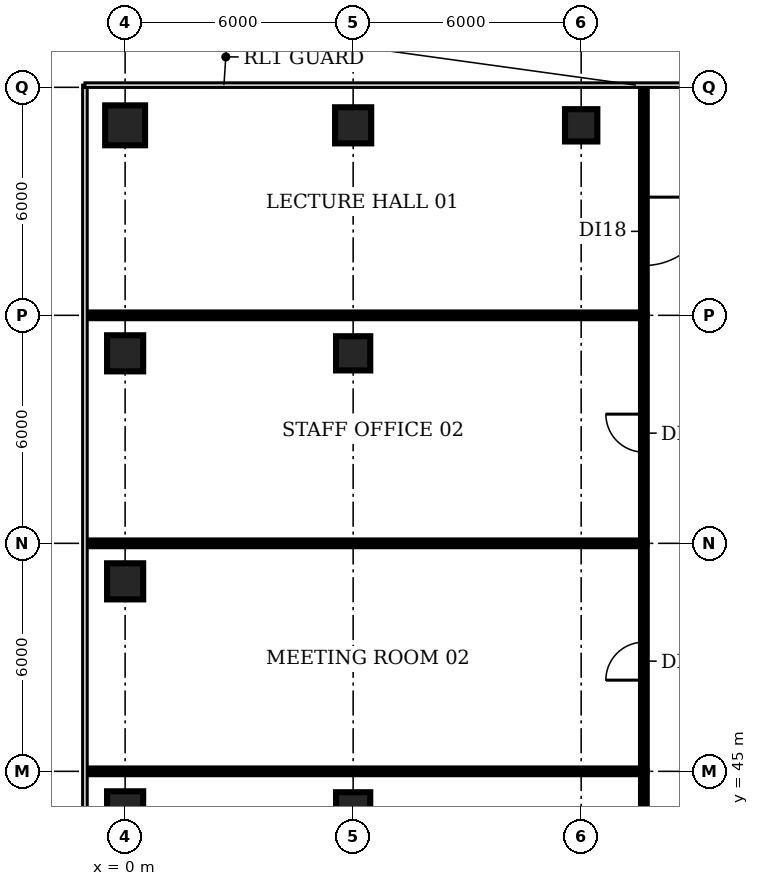
"""IFC4 building model, lengths in metres.
Left out: names, types, materials, properties, quantities, classifications, styles, units other than length and angle.
Written with IfcOpenShell. Run it as: python <this file> out.ifc"""

import sys

from ifc_helpers import new_model, si_unit, direction, frame, frame_2d, origin, origin_2d, place, context, subcontext, project, spatial, rectangle, circle, extrude, element, fill, save


model = new_model("IFC4")
c1 = context("Model", 3, precision=1e-05, world=origin(), true_north=direction((0.0, 1.0)))
c2 = subcontext(c1, "Body", "Model", "MODEL_VIEW")
j1 = project(units=[si_unit("LENGTHUNIT", "METRE"), si_unit("PLANEANGLEUNIT", "RADIAN")], contexts=[c1])
p1 = place(None, origin())
s1 = spatial("IfcSite", under=j1, at=p1, CompositionType="ELEMENT")
p2 = place(p1, origin())
s2 = spatial("IfcBuilding", under=s1, at=p2, CompositionType="ELEMENT")
p3 = place(p2, frame((0.0, 0.0, 146.6)))
s3 = spatial("IfcBuildingStorey", under=s2, at=p3, CompositionType="ELEMENT", Elevation=146.6)
for number, where, z_axis, x_axis in (
    (1, (0.0, 44.0, -0.35), (0.0, 0.0, 1.0), (1.0, 0.0, 0.0)),
    (2, (0.0, 50.0, -0.35), (0.0, 0.0, 1.0), (1.0, 0.0, 0.0)),
    (3, (0.0, 56.0, -0.35), (0.0, 0.0, 1.0), (1.0, 0.0, 0.0)),
):
    element("IfcColumn", number, at=place(p3, frame(where, z_axis=z_axis, x_axis=x_axis)), inside=s3, PredefinedType="COLUMN", context=c2, shape_type="SweptSolid", body=[
        extrude(rectangle(XDim=0.95, YDim=0.95, at=origin_2d()), origin(), (0.0, 0.0, 1.0), 4.2),
    ])
p4 = place(p3, frame((0.0, 62.0, -0.35), z_axis=(0.0, 0.0, 1.0), x_axis=(1.0, 0.0, 0.0)))
e4 = element("IfcColumn", 4, at=p4, inside=s3, PredefinedType="COLUMN", context=c2, shape_type="SweptSolid", body=[
    extrude(circle(Radius=0.525, at=origin_2d()), origin(), (0.0, 0.0, 1.0), 4.2),
])
for number, where, z_axis, x_axis in (
    (5, (6.0, 44.0, -0.35), (0.0, 0.0, 1.0), (1.0, 0.0, 0.0)),
    (6, (6.0, 56.0, -0.35), (0.0, 0.0, 1.0), (1.0, 0.0, 0.0)),
):
    element("IfcColumn", number, at=place(p3, frame(where, z_axis=z_axis, x_axis=x_axis)), inside=s3, PredefinedType="COLUMN", context=c2, shape_type="SweptSolid", body=[
        extrude(rectangle(XDim=0.9, YDim=0.9, at=origin_2d()), origin(), (0.0, 0.0, 1.0), 4.2),
    ])
p5 = place(p3, frame((6.0, 62.0, -0.35), z_axis=(0.0, 0.0, 1.0), x_axis=(1.0, 0.0, 0.0)))
e7 = element("IfcColumn", 7, at=p5, inside=s3, PredefinedType="COLUMN", context=c2, shape_type="SweptSolid", body=[
    extrude(rectangle(XDim=0.95, YDim=0.95, at=origin_2d()), origin(), (0.0, 0.0, 1.0), 4.2),
])
p6 = place(p3, frame((12.0, 62.0, 0.0), z_axis=(0.0, 0.0, 1.0), x_axis=(1.0, 0.0, 0.0)))
e8 = element("IfcColumn", 8, at=p6, inside=s3, PredefinedType="COLUMN", context=c2, shape_type="SweptSolid", body=[
    extrude(rectangle(XDim=0.85, YDim=0.85, at=origin_2d()), origin(), (0.0, 0.0, 1.0), 3.85),
])
for number, where, z_axis, x_axis in (
    (9, (-1.01, 45.0, 0.0), (0.0, 0.0, 1.0), (1.0, 0.0, 0.0)),
    (10, (-1.01, 51.0, 0.0), (0.0, 0.0, 1.0), (1.0, 0.0, 0.0)),
):
    element("IfcWall", number, at=place(p3, frame(where, z_axis=z_axis, x_axis=x_axis)), inside=s3, PredefinedType="PARTITIONING", context=c2, shape_type="SweptSolid", body=[
        extrude(rectangle(XDim=14.66, YDim=0.15, at=frame_2d((7.33, 0.0))), origin(), (0.0, 0.0, 1.0), 2.88),
    ])
p7 = place(p3, frame((-0.993, 57.0, 0.0), z_axis=(0.0, 0.0, 1.0), x_axis=(1.0, 0.0, 0.0)))
e11 = element("IfcWall", 11, at=p7, inside=s3, PredefinedType="PARTITIONING", context=c2, shape_type="SweptSolid", body=[
    extrude(rectangle(XDim=14.643, YDim=0.15, at=frame_2d((7.321, 0.0))), origin(), (0.0, 0.0, 1.0), 2.88),
])
p8 = place(p3, frame((13.65, 34.1, 0.0), z_axis=(0.0, 0.0, 1.0), x_axis=(0.0, 1.0, 0.0)))
e12 = element("IfcWall", 12, at=p8, inside=s3, PredefinedType="PARTITIONING", context=c2, shape_type="SweptSolid", body=[
    extrude(rectangle(XDim=10.9, YDim=0.15, at=frame_2d((5.45, 0.0))), origin(), (0.0, 0.0, 1.0), 2.88),
])
p9 = place(p8, frame((4.9, 0.0, 0.0)))
e13 = element("IfcOpeningElement", 13, at=p9, cuts=e12, PredefinedType="OPENING", context=c2, shape_type="SweptSolid", body=[
    extrude(rectangle(XDim=1.0, YDim=2.1, at=frame_2d((0.5, 1.05))), frame((0.0, 0.085, 0.0), z_axis=(0.0, -1.0, 0.0), x_axis=(1.0, 0.0, 0.0)), (0.0, 0.0, 1.0), 0.17),
])
p10 = place(p3, frame((13.65, 45.0, 0.0), z_axis=(0.0, 0.0, 1.0), x_axis=(0.0, 1.0, 0.0)))
e14 = element("IfcWall", 14, at=p10, inside=s3, PredefinedType="PARTITIONING", context=c2, shape_type="SweptSolid", body=[
    extrude(rectangle(XDim=6.0, YDim=0.15, at=frame_2d((3.0, 0.0))), origin(), (0.0, 0.0, 1.0), 2.88),
])
p11 = place(p10, frame((2.4, 0.0, 0.0)))
e15 = element("IfcOpeningElement", 15, at=p11, cuts=e14, PredefinedType="OPENING", context=c2, shape_type="SweptSolid", body=[
    extrude(rectangle(XDim=1.0, YDim=2.1, at=frame_2d((0.5, 1.05))), frame((0.0, 0.085, 0.0), z_axis=(0.0, -1.0, 0.0), x_axis=(1.0, 0.0, 0.0)), (0.0, 0.0, 1.0), 0.17),
])
p12 = place(p3, frame((13.65, 51.0, 0.0), z_axis=(0.0, 0.0, 1.0), x_axis=(0.0, 1.0, 0.0)))
e16 = element("IfcWall", 16, at=p12, inside=s3, PredefinedType="PARTITIONING", context=c2, shape_type="SweptSolid", body=[
    extrude(rectangle(XDim=6.0, YDim=0.15, at=frame_2d((3.0, 0.0))), origin(), (0.0, 0.0, 1.0), 2.88),
])
p13 = place(p12, frame((2.4, 0.0, 0.0)))
e17 = element("IfcOpeningElement", 17, at=p13, cuts=e16, PredefinedType="OPENING", context=c2, shape_type="SweptSolid", body=[
    extrude(rectangle(XDim=1.0, YDim=2.1, at=frame_2d((0.5, 1.05))), frame((0.0, 0.085, 0.0), z_axis=(0.0, -1.0, 0.0), x_axis=(1.0, 0.0, 0.0)), (0.0, 0.0, 1.0), 0.17),
])
p14 = place(p3, frame((13.65, 63.01, 0.0), z_axis=(0.0, 0.0, 1.0), x_axis=(0.0, -1.0, 0.0)))
e18 = element("IfcWall", 18, at=p14, inside=s3, PredefinedType="PARTITIONING", context=c2, shape_type="SweptSolid", body=[
    extrude(rectangle(XDim=6.01, YDim=0.15, at=frame_2d((3.005, 0.0))), origin(), (0.0, 0.0, 1.0), 2.88),
])
p15 = place(p14, frame((2.9, 0.0, 0.0)))
e19 = element("IfcOpeningElement", 19, at=p15, cuts=e18, PredefinedType="OPENING", context=c2, shape_type="SweptSolid", body=[
    extrude(rectangle(XDim=1.8, YDim=2.1, at=frame_2d((0.9, 1.05))), frame((0.0, 0.085, 0.0), z_axis=(0.0, -1.0, 0.0), x_axis=(1.0, 0.0, 0.0)), (0.0, 0.0, 1.0), 0.17),
])
p16 = place(p11, origin())
e20 = element("IfcDoor", 20, at=p16, inside=s3, OperationType="SINGLE_SWING_LEFT", PredefinedType="DOOR", context=c2, shape_type="SweptSolid", body=[
    extrude(rectangle(XDim=1.0, YDim=2.1, at=frame_2d((0.5, 1.05))), frame((0.0, 0.025, 0.0), z_axis=(0.0, -1.0, 0.0), x_axis=(1.0, 0.0, 0.0)), (0.0, 0.0, 1.0), 0.05),
])
fill(e15, e20)
p17 = place(p13, origin())
e21 = element("IfcDoor", 21, at=p17, inside=s3, OperationType="SINGLE_SWING_RIGHT", PredefinedType="DOOR", context=c2, shape_type="SweptSolid", body=[
    extrude(rectangle(XDim=1.0, YDim=2.1, at=frame_2d((0.5, 1.05))), frame((0.0, 0.025, 0.0), z_axis=(0.0, -1.0, 0.0), x_axis=(1.0, 0.0, 0.0)), (0.0, 0.0, 1.0), 0.05),
])
fill(e17, e21)
p18 = place(p15, origin())
e22 = element("IfcDoor", 22, at=p18, inside=s3, OperationType="SINGLE_SWING_LEFT", PredefinedType="DOOR", context=c2, shape_type="SweptSolid", body=[
    extrude(rectangle(XDim=1.8, YDim=2.1, at=frame_2d((0.9, 1.05))), frame((0.0, 0.025, 0.0), z_axis=(0.0, -1.0, 0.0), x_axis=(1.0, 0.0, 0.0)), (0.0, 0.0, 1.0), 0.05),
])
fill(e19, e22)
save(model, sys.argv[1])
